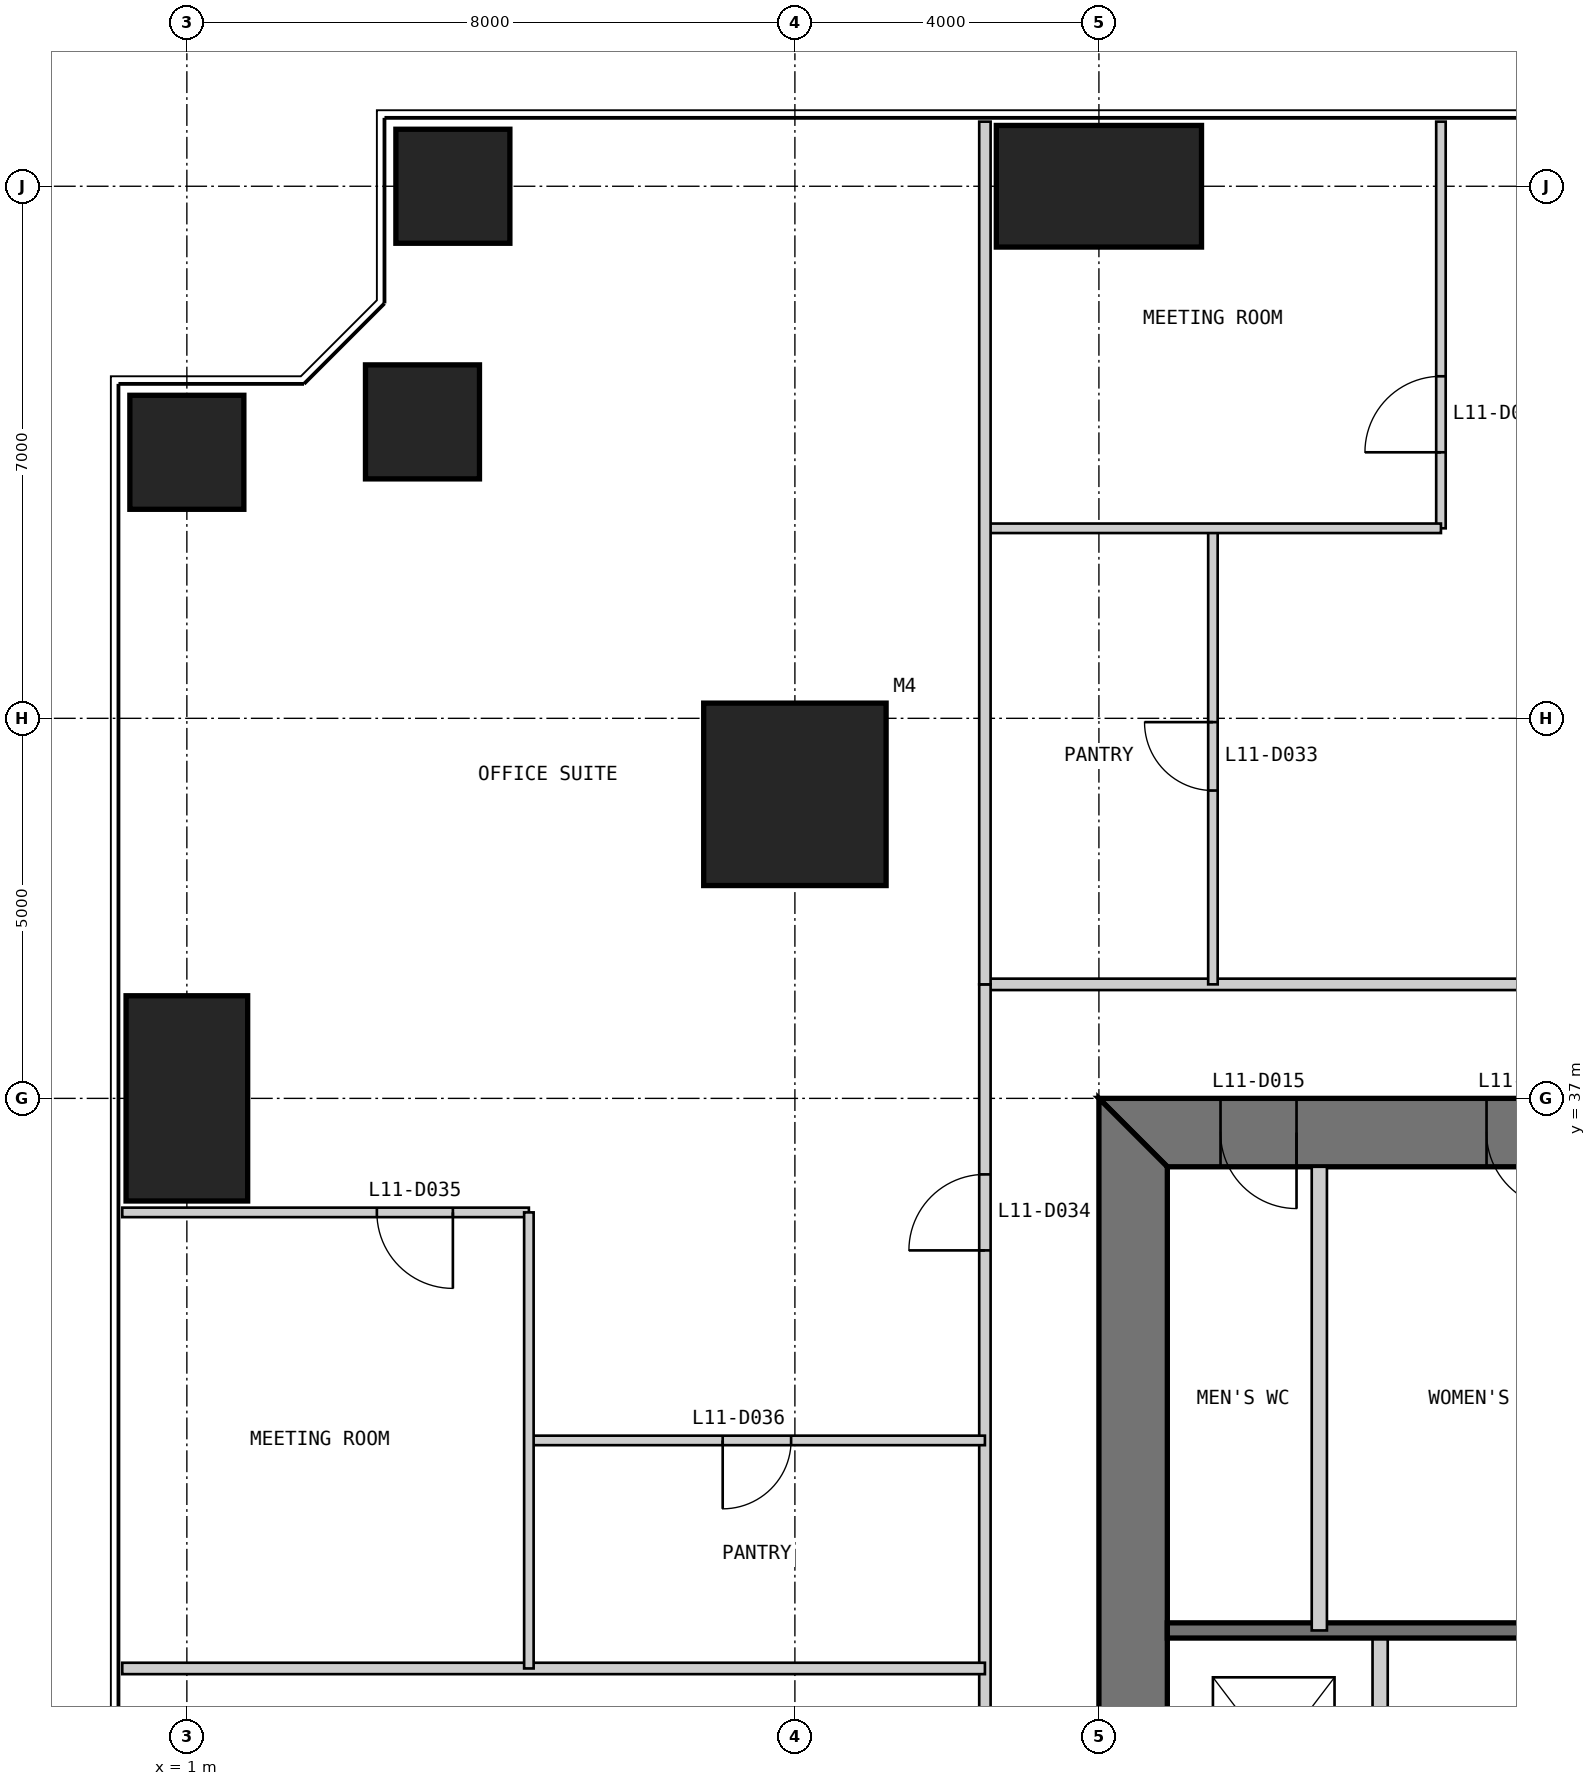
"""IFC4 building model, lengths in metres.
Left out: names, types, materials, properties, quantities, classifications, styles, units other than length and angle.
Written with IfcOpenShell. Run it as: python <this file> out.ifc"""

import sys

from ifc_helpers import new_model, si_unit, direction, frame, frame_2d, origin, origin_2d, place, context, subcontext, project, spatial, polyline, rectangle, outline, extrude, element, fill, save


model = new_model("IFC4")
c1 = context("Model", 3, precision=1e-05, world=origin(), true_north=direction((0.0, 1.0)))
c2 = subcontext(c1, "Body", "Model", "MODEL_VIEW")
j1 = project(units=[si_unit("LENGTHUNIT", "METRE"), si_unit("PLANEANGLEUNIT", "RADIAN")], contexts=[c1])
p1 = place(None, origin())
s1 = spatial("IfcSite", under=j1, at=p1, CompositionType="ELEMENT")
p2 = place(p1, origin())
s2 = spatial("IfcBuilding", under=s1, at=p2, CompositionType="ELEMENT")
p3 = place(p2, frame((0.0, 0.0, 51.0)))
s3 = spatial("IfcBuildingStorey", under=s2, at=p3, CompositionType="ELEMENT", Elevation=51.0)
p4 = place(p3, frame((9.0, 41.0, 0.0), z_axis=(0.0, 0.0, 1.0), x_axis=(1.0, 0.0, 0.0)))
e1 = element("IfcColumn", 1, at=p4, inside=s3, PredefinedType="COLUMN", context=c2, shape_type="SweptSolid", body=[
    extrude(rectangle(XDim=2.4, YDim=2.4, at=origin_2d()), origin(), (0.0, 0.0, 1.0), 4.0),
])
p5 = place(p3, frame((13.0, 49.0, 0.0), z_axis=(0.0, 0.0, 1.0), x_axis=(1.0, 0.0, 0.0)))
e2 = element("IfcColumn", 2, at=p5, inside=s3, PredefinedType="COLUMN", context=c2, shape_type="SweptSolid", body=[
    extrude(rectangle(XDim=2.7, YDim=1.6, at=origin_2d()), origin(), (0.0, 0.0, 1.0), 4.0),
])
for number, where, z_axis, x_axis in (
    (3, (4.5, 49.0, 0.0), (0.0, 0.0, 1.0), (1.0, 0.0, 0.0)),
    (4, (4.1, 45.9, 0.0), (0.0, 0.0, 1.0), (1.0, 0.0, 0.0)),
    (5, (1.0, 45.5, 0.0), (0.0, 0.0, 1.0), (1.0, 0.0, 0.0)),
):
    element("IfcColumn", number, at=place(p3, frame(where, z_axis=z_axis, x_axis=x_axis)), inside=s3, PredefinedType="COLUMN", context=c2, shape_type="SweptSolid", body=[
        extrude(rectangle(XDim=1.5, YDim=1.5, at=origin_2d()), origin(), (0.0, 0.0, 1.0), 4.0),
    ])
p6 = place(p3, frame((1.0, 37.0, 0.0), z_axis=(0.0, 0.0, 1.0), x_axis=(1.0, 0.0, 0.0)))
e6 = element("IfcColumn", 6, at=p6, inside=s3, PredefinedType="COLUMN", context=c2, shape_type="SweptSolid", body=[
    extrude(rectangle(XDim=1.6, YDim=2.7, at=origin_2d()), origin(), (0.0, 0.0, 1.0), 4.0),
])
p7 = place(p3, frame((37.0, 36.55, 0.0), z_axis=(0.0, 0.0, 1.0), x_axis=(-1.0, 0.0, 0.0)))
e7 = element("IfcWall", 7, at=p7, inside=s3, PredefinedType="SHEAR", context=c2, shape_type="SweptSolid", body=[
    extrude(outline(polyline([(0.0, -0.45), (24.0, -0.45), (23.1, 0.45), (0.9, 0.45), (0.0, -0.45)])), origin(), (0.0, 0.0, 1.0), 4.0),
])
p8 = place(p7, frame((4.9, 0.0, 0.0)))
e8 = element("IfcOpeningElement", 8, at=p8, cuts=e7, PredefinedType="OPENING", context=c2, shape_type="SweptSolid", body=[
    extrude(rectangle(XDim=1.0, YDim=2.2, at=frame_2d((0.5, 1.1))), frame((0.0, 0.46, 0.0), z_axis=(0.0, -1.0, 0.0), x_axis=(1.0, 0.0, 0.0)), (0.0, 0.0, 1.0), 0.92),
])
p9 = place(p7, frame((8.9, 0.0, 0.0)))
e9 = element("IfcOpeningElement", 9, at=p9, cuts=e7, PredefinedType="OPENING", context=c2, shape_type="SweptSolid", body=[
    extrude(rectangle(XDim=1.1, YDim=2.2, at=frame_2d((0.55, 1.1))), frame((0.0, 0.46, 0.0), z_axis=(0.0, -1.0, 0.0), x_axis=(1.0, 0.0, 0.0)), (0.0, 0.0, 1.0), 0.92),
])
p10 = place(p7, frame((15.05, 0.0, 0.0)))
e10 = element("IfcOpeningElement", 10, at=p10, cuts=e7, PredefinedType="OPENING", context=c2, shape_type="SweptSolid", body=[
    extrude(rectangle(XDim=0.9, YDim=2.2, at=frame_2d((0.45, 1.1))), frame((0.0, 0.46, 0.0), z_axis=(0.0, -1.0, 0.0), x_axis=(1.0, 0.0, 0.0)), (0.0, 0.0, 1.0), 0.92),
])
p11 = place(p7, frame((17.9, 0.0, 0.0)))
e11 = element("IfcOpeningElement", 11, at=p11, cuts=e7, PredefinedType="OPENING", context=c2, shape_type="SweptSolid", body=[
    extrude(rectangle(XDim=1.0, YDim=2.2, at=frame_2d((0.5, 1.1))), frame((0.0, 0.46, 0.0), z_axis=(0.0, -1.0, 0.0), x_axis=(1.0, 0.0, 0.0)), (0.0, 0.0, 1.0), 0.92),
])
p12 = place(p7, frame((21.4, 0.0, 0.0)))
e12 = element("IfcOpeningElement", 12, at=p12, cuts=e7, PredefinedType="OPENING", context=c2, shape_type="SweptSolid", body=[
    extrude(rectangle(XDim=1.0, YDim=2.2, at=frame_2d((0.5, 1.1))), frame((0.0, 0.46, 0.0), z_axis=(0.0, -1.0, 0.0), x_axis=(1.0, 0.0, 0.0)), (0.0, 0.0, 1.0), 0.92),
])
p13 = place(p3, frame((13.45, 36.1, 0.0), z_axis=(0.0, 0.0, 1.0), x_axis=(0.0, -1.0, 0.0)))
e13 = element("IfcWall", 13, at=p13, inside=s3, PredefinedType="SHEAR", context=c2, shape_type="SweptSolid", body=[
    extrude(outline(polyline([(-0.9, -0.45), (23.1, -0.45), (22.2, 0.45), (0.0, 0.45), (-0.9, -0.45)])), origin(), (0.0, 0.0, 1.0), 4.0),
])
p14 = place(p13, frame((20.2, 0.0, 0.0)))
e14 = element("IfcOpeningElement", 14, at=p14, cuts=e13, PredefinedType="OPENING", context=c2, shape_type="SweptSolid", body=[
    extrude(rectangle(XDim=1.0, YDim=2.2, at=frame_2d((0.5, 1.1))), frame((0.0, 0.46, 0.0), z_axis=(0.0, -1.0, 0.0), x_axis=(1.0, 0.0, 0.0)), (0.0, 0.0, 1.0), 0.92),
])
p15 = place(p13, frame((17.25, 0.0, 0.0)))
e15 = element("IfcOpeningElement", 15, at=p15, cuts=e13, PredefinedType="OPENING", context=c2, shape_type="SweptSolid", body=[
    extrude(rectangle(XDim=0.9, YDim=2.2, at=frame_2d((0.45, 1.1))), frame((0.0, 0.46, 0.0), z_axis=(0.0, -1.0, 0.0), x_axis=(1.0, 0.0, 0.0)), (0.0, 0.0, 1.0), 0.92),
])
p16 = place(p3, frame((16.7, 13.9, 0.0), z_axis=(0.0, 0.0, 1.0), x_axis=(0.0, 1.0, 0.0)))
e16 = element("IfcWall", 16, at=p16, inside=s3, PredefinedType="PARTITIONING", context=c2, shape_type="SweptSolid", body=[
    extrude(rectangle(XDim=16.1, YDim=0.2, at=frame_2d((8.05, 0.0))), origin(), (0.0, 0.0, 1.0), 3.8),
])
p17 = place(p16, frame((4.1, 0.0, 0.0)))
e17 = element("IfcOpeningElement", 17, at=p17, cuts=e16, PredefinedType="OPENING", context=c2, shape_type="SweptSolid", body=[
    extrude(rectangle(XDim=0.9, YDim=2.2, at=frame_2d((0.45, 1.1))), frame((0.0, 0.11, 0.0), z_axis=(0.0, -1.0, 0.0), x_axis=(1.0, 0.0, 0.0)), (0.0, 0.0, 1.0), 0.22),
])
p18 = place(p16, frame((7.217, 0.0, 0.0)))
e18 = element("IfcOpeningElement", 18, at=p18, cuts=e16, PredefinedType="OPENING", context=c2, shape_type="SweptSolid", body=[
    extrude(rectangle(XDim=1.1, YDim=2.2, at=frame_2d((0.55, 1.1))), frame((0.0, 0.11, 0.0), z_axis=(0.0, -1.0, 0.0), x_axis=(1.0, 0.0, 0.0)), (0.0, 0.0, 1.0), 0.22),
])
p19 = place(p16, frame((10.55, 0.0, 0.0)))
e19 = element("IfcOpeningElement", 19, at=p19, cuts=e16, PredefinedType="OPENING", context=c2, shape_type="SweptSolid", body=[
    extrude(rectangle(XDim=1.1, YDim=2.2, at=frame_2d((0.55, 1.1))), frame((0.0, 0.11, 0.0), z_axis=(0.0, -1.0, 0.0), x_axis=(1.0, 0.0, 0.0)), (0.0, 0.0, 1.0), 0.22),
])
p20 = place(p16, frame((13.883, 0.0, 0.0)))
e20 = element("IfcOpeningElement", 20, at=p20, cuts=e16, PredefinedType="OPENING", context=c2, shape_type="SweptSolid", body=[
    extrude(rectangle(XDim=1.1, YDim=2.2, at=frame_2d((0.55, 1.1))), frame((0.0, 0.11, 0.0), z_axis=(0.0, -1.0, 0.0), x_axis=(1.0, 0.0, 0.0)), (0.0, 0.0, 1.0), 0.22),
])
p21 = place(p3, frame((29.7, 30.0, 0.0), z_axis=(0.0, 0.0, 1.0), x_axis=(-1.0, 0.0, 0.0)))
e21 = element("IfcWall", 21, at=p21, inside=s3, PredefinedType="SOLIDWALL", context=c2, shape_type="SweptSolid", body=[
    extrude(rectangle(XDim=15.8, YDim=0.2, at=frame_2d((7.9, 0.0))), origin(), (0.0, 0.0, 1.0), 3.8),
])
p22 = place(p3, frame((15.9, 36.1, 0.0), z_axis=(0.0, 0.0, 1.0), x_axis=(0.0, -1.0, 0.0)))
e22 = element("IfcWall", 22, at=p22, inside=s3, PredefinedType="PARTITIONING", context=c2, shape_type="SweptSolid", body=[
    extrude(rectangle(XDim=6.1, YDim=0.2, at=frame_2d((3.05, 0.0))), origin(), (0.0, 0.0, 1.0), 3.8),
])
p23 = place(p3, frame((38.5, 38.5, 0.0), z_axis=(0.0, 0.0, 1.0), x_axis=(-1.0, 0.0, 0.0)))
e23 = element("IfcWall", 23, at=p23, inside=s3, PredefinedType="PARTITIONING", context=c2, shape_type="SweptSolid", body=[
    extrude(rectangle(XDim=27.0, YDim=0.15, at=frame_2d((13.5, 0.0))), origin(), (0.0, 0.0, 1.0), 3.85),
])
p24 = place(p23, frame((2.5, 0.0, 0.0)))
e24 = element("IfcOpeningElement", 24, at=p24, cuts=e23, PredefinedType="OPENING", context=c2, shape_type="SweptSolid", body=[
    extrude(rectangle(XDim=1.0, YDim=2.2, at=frame_2d((0.5, 1.1))), frame((0.0, 0.085, 0.0), z_axis=(0.0, -1.0, 0.0), x_axis=(1.0, 0.0, 0.0)), (0.0, 0.0, 1.0), 0.17),
])
p25 = place(p23, frame((16.0, 0.0, 0.0)))
e25 = element("IfcOpeningElement", 25, at=p25, cuts=e23, PredefinedType="OPENING", context=c2, shape_type="SweptSolid", body=[
    extrude(rectangle(XDim=1.0, YDim=2.2, at=frame_2d((0.5, 1.1))), frame((0.0, 0.085, 0.0), z_axis=(0.0, -1.0, 0.0), x_axis=(1.0, 0.0, 0.0)), (0.0, 0.0, 1.0), 0.17),
])
p26 = place(p3, frame((17.5, 49.85, 0.0), z_axis=(0.0, 0.0, 1.0), x_axis=(0.0, -1.0, 0.0)))
e26 = element("IfcWall", 26, at=p26, inside=s3, PredefinedType="PARTITIONING", context=c2, shape_type="SweptSolid", body=[
    extrude(rectangle(XDim=5.35, YDim=0.125, at=frame_2d((2.675, 0.0))), origin(), (0.0, 0.0, 1.0), 3.85),
])
p27 = place(p26, frame((3.35, 0.0, 0.0)))
e27 = element("IfcOpeningElement", 27, at=p27, cuts=e26, PredefinedType="OPENING", context=c2, shape_type="SweptSolid", body=[
    extrude(rectangle(XDim=1.0, YDim=2.2, at=frame_2d((0.5, 1.1))), frame((0.0, 0.073, 0.0), z_axis=(0.0, -1.0, 0.0), x_axis=(1.0, 0.0, 0.0)), (0.0, 0.0, 1.0), 0.145),
])
p28 = place(p3, frame((14.5, 44.5, 0.0), z_axis=(0.0, 0.0, 1.0), x_axis=(0.0, -1.0, 0.0)))
e28 = element("IfcWall", 28, at=p28, inside=s3, PredefinedType="PARTITIONING", context=c2, shape_type="SweptSolid", body=[
    extrude(rectangle(XDim=6.0, YDim=0.125, at=frame_2d((3.0, 0.0))), origin(), (0.0, 0.0, 1.0), 3.85),
])
p29 = place(p28, frame((2.55, 0.0, 0.0)))
e29 = element("IfcOpeningElement", 29, at=p29, cuts=e28, PredefinedType="OPENING", context=c2, shape_type="SweptSolid", body=[
    extrude(rectangle(XDim=0.9, YDim=2.2, at=frame_2d((0.45, 1.1))), frame((0.0, 0.073, 0.0), z_axis=(0.0, -1.0, 0.0), x_axis=(1.0, 0.0, 0.0)), (0.0, 0.0, 1.0), 0.145),
])
p30 = place(p3, frame((17.5, 44.5, 0.0), z_axis=(0.0, 0.0, 1.0), x_axis=(-1.0, 0.0, 0.0)))
e30 = element("IfcWall", 30, at=p30, inside=s3, PredefinedType="PARTITIONING", context=c2, shape_type="SweptSolid", body=[
    extrude(rectangle(XDim=6.0, YDim=0.125, at=frame_2d((3.0, 0.0))), origin(), (0.0, 0.0, 1.0), 3.85),
])
p31 = place(p3, frame((11.5, 38.5, 0.0), z_axis=(0.0, 0.0, 1.0), x_axis=(0.0, -1.0, 0.0)))
e31 = element("IfcWall", 31, at=p31, inside=s3, PredefinedType="PARTITIONING", context=c2, shape_type="SweptSolid", body=[
    extrude(rectangle(XDim=27.0, YDim=0.15, at=frame_2d((13.5, 0.0))), origin(), (0.0, 0.0, 1.0), 3.85),
])
p32 = place(p31, frame((2.5, 0.0, 0.0)))
e32 = element("IfcOpeningElement", 32, at=p32, cuts=e31, PredefinedType="OPENING", context=c2, shape_type="SweptSolid", body=[
    extrude(rectangle(XDim=1.0, YDim=2.2, at=frame_2d((0.5, 1.1))), frame((0.0, 0.085, 0.0), z_axis=(0.0, -1.0, 0.0), x_axis=(1.0, 0.0, 0.0)), (0.0, 0.0, 1.0), 0.17),
])
p33 = place(p31, frame((13.0, 0.0, 0.0)))
e33 = element("IfcOpeningElement", 33, at=p33, cuts=e31, PredefinedType="OPENING", context=c2, shape_type="SweptSolid", body=[
    extrude(rectangle(XDim=1.0, YDim=2.2, at=frame_2d((0.5, 1.1))), frame((0.0, 0.085, 0.0), z_axis=(0.0, -1.0, 0.0), x_axis=(1.0, 0.0, 0.0)), (0.0, 0.0, 1.0), 0.17),
])
p34 = place(p31, frame((23.5, 0.0, 0.0)))
e34 = element("IfcOpeningElement", 34, at=p34, cuts=e31, PredefinedType="OPENING", context=c2, shape_type="SweptSolid", body=[
    extrude(rectangle(XDim=1.0, YDim=2.2, at=frame_2d((0.5, 1.1))), frame((0.0, 0.085, 0.0), z_axis=(0.0, -1.0, 0.0), x_axis=(1.0, 0.0, 0.0)), (0.0, 0.0, 1.0), 0.17),
])
p35 = place(p3, frame((11.5, 49.85, 0.0), z_axis=(0.0, 0.0, 1.0), x_axis=(0.0, -1.0, 0.0)))
e35 = element("IfcWall", 35, at=p35, inside=s3, PredefinedType="PARTITIONING", context=c2, shape_type="SweptSolid", body=[
    extrude(rectangle(XDim=11.35, YDim=0.15, at=frame_2d((5.675, 0.0))), origin(), (0.0, 0.0, 1.0), 3.85),
])
p36 = place(p3, frame((0.15, 35.5, 0.0), z_axis=(0.0, 0.0, 1.0), x_axis=(1.0, 0.0, 0.0)))
e36 = element("IfcWall", 36, at=p36, inside=s3, PredefinedType="PARTITIONING", context=c2, shape_type="SweptSolid", body=[
    extrude(rectangle(XDim=5.35, YDim=0.125, at=frame_2d((2.675, 0.0))), origin(), (0.0, 0.0, 1.0), 3.85),
])
p37 = place(p36, frame((3.35, 0.0, 0.0)))
e37 = element("IfcOpeningElement", 37, at=p37, cuts=e36, PredefinedType="OPENING", context=c2, shape_type="SweptSolid", body=[
    extrude(rectangle(XDim=1.0, YDim=2.2, at=frame_2d((0.5, 1.1))), frame((0.0, 0.073, 0.0), z_axis=(0.0, -1.0, 0.0), x_axis=(1.0, 0.0, 0.0)), (0.0, 0.0, 1.0), 0.145),
])
p38 = place(p3, frame((5.5, 32.5, 0.0), z_axis=(0.0, 0.0, 1.0), x_axis=(1.0, 0.0, 0.0)))
e38 = element("IfcWall", 38, at=p38, inside=s3, PredefinedType="PARTITIONING", context=c2, shape_type="SweptSolid", body=[
    extrude(rectangle(XDim=6.0, YDim=0.125, at=frame_2d((3.0, 0.0))), origin(), (0.0, 0.0, 1.0), 3.85),
])
p39 = place(p38, frame((2.55, 0.0, 0.0)))
e39 = element("IfcOpeningElement", 39, at=p39, cuts=e38, PredefinedType="OPENING", context=c2, shape_type="SweptSolid", body=[
    extrude(rectangle(XDim=0.9, YDim=2.2, at=frame_2d((0.45, 1.1))), frame((0.0, 0.073, 0.0), z_axis=(0.0, -1.0, 0.0), x_axis=(1.0, 0.0, 0.0)), (0.0, 0.0, 1.0), 0.145),
])
p40 = place(p3, frame((0.15, 29.5, 0.0), z_axis=(0.0, 0.0, 1.0), x_axis=(1.0, 0.0, 0.0)))
e40 = element("IfcWall", 40, at=p40, inside=s3, PredefinedType="PARTITIONING", context=c2, shape_type="SweptSolid", body=[
    extrude(rectangle(XDim=11.35, YDim=0.15, at=frame_2d((5.675, 0.0))), origin(), (0.0, 0.0, 1.0), 3.85),
])
p41 = place(p3, frame((5.5, 35.5, 0.0), z_axis=(0.0, 0.0, 1.0), x_axis=(0.0, -1.0, 0.0)))
e41 = element("IfcWall", 41, at=p41, inside=s3, PredefinedType="PARTITIONING", context=c2, shape_type="SweptSolid", body=[
    extrude(rectangle(XDim=6.0, YDim=0.125, at=frame_2d((3.0, 0.0))), origin(), (0.0, 0.0, 1.0), 3.85),
])
p42 = place(p11, origin())
e42 = element("IfcDoor", 42, at=p42, inside=s3, OperationType="SINGLE_SWING_LEFT", PredefinedType="DOOR", context=c2, shape_type="SweptSolid", body=[
    extrude(rectangle(XDim=1.0, YDim=2.2, at=frame_2d((0.5, 1.1))), frame((0.0, 0.025, 0.0), z_axis=(0.0, -1.0, 0.0), x_axis=(1.0, 0.0, 0.0)), (0.0, 0.0, 1.0), 0.05),
    extrude(outline(polyline([(0.0, 0.0), (0.04, 0.0), (0.04, 2.16), (0.96, 2.16), (0.96, 0.0), (1.0, 0.0), (1.0, 2.2), (0.0, 2.2), (0.0, 0.0)])), frame((0.0, 0.3, 0.0), z_axis=(0.0, -1.0, 0.0), x_axis=(1.0, 0.0, 0.0)), (0.0, 0.0, 1.0), 0.6),
])
fill(e11, e42)
p43 = place(p12, origin())
e43 = element("IfcDoor", 43, at=p43, inside=s3, OperationType="SINGLE_SWING_LEFT", PredefinedType="DOOR", context=c2, shape_type="SweptSolid", body=[
    extrude(rectangle(XDim=1.0, YDim=2.2, at=frame_2d((0.5, 1.1))), frame((0.0, 0.025, 0.0), z_axis=(0.0, -1.0, 0.0), x_axis=(1.0, 0.0, 0.0)), (0.0, 0.0, 1.0), 0.05),
    extrude(outline(polyline([(0.0, 0.0), (0.04, 0.0), (0.04, 2.16), (0.96, 2.16), (0.96, 0.0), (1.0, 0.0), (1.0, 2.2), (0.0, 2.2), (0.0, 0.0)])), frame((0.0, 0.3, 0.0), z_axis=(0.0, -1.0, 0.0), x_axis=(1.0, 0.0, 0.0)), (0.0, 0.0, 1.0), 0.6),
])
fill(e12, e43)
p44 = place(p27, frame((1.0, 0.0, 0.0), z_axis=(0.0, 0.0, 1.0), x_axis=(-1.0, 0.0, 0.0)))
e44 = element("IfcDoor", 44, at=p44, inside=s3, OperationType="SINGLE_SWING_LEFT", PredefinedType="DOOR", context=c2, shape_type="SweptSolid", body=[
    extrude(rectangle(XDim=1.0, YDim=2.2, at=frame_2d((0.5, 1.1))), frame((0.0, 0.025, 0.0), z_axis=(0.0, -1.0, 0.0), x_axis=(1.0, 0.0, 0.0)), (0.0, 0.0, 1.0), 0.05),
])
fill(e27, e44)
p45 = place(p29, frame((0.9, 0.0, 0.0), z_axis=(0.0, 0.0, 1.0), x_axis=(-1.0, 0.0, 0.0)))
e45 = element("IfcDoor", 45, at=p45, inside=s3, OperationType="SINGLE_SWING_RIGHT", PredefinedType="DOOR", context=c2, shape_type="SweptSolid", body=[
    extrude(rectangle(XDim=0.9, YDim=2.2, at=frame_2d((0.45, 1.1))), frame((0.0, 0.025, 0.0), z_axis=(0.0, -1.0, 0.0), x_axis=(1.0, 0.0, 0.0)), (0.0, 0.0, 1.0), 0.05),
])
fill(e29, e45)
p46 = place(p32, frame((1.0, 0.0, 0.0), z_axis=(0.0, 0.0, 1.0), x_axis=(-1.0, 0.0, 0.0)))
e46 = element("IfcDoor", 46, at=p46, inside=s3, OperationType="SINGLE_SWING_LEFT", PredefinedType="DOOR", context=c2, shape_type="SweptSolid", body=[
    extrude(rectangle(XDim=1.0, YDim=2.2, at=frame_2d((0.5, 1.1))), frame((0.0, 0.025, 0.0), z_axis=(0.0, -1.0, 0.0), x_axis=(1.0, 0.0, 0.0)), (0.0, 0.0, 1.0), 0.05),
])
fill(e32, e46)
p47 = place(p37, frame((1.0, 0.0, 0.0), z_axis=(0.0, 0.0, 1.0), x_axis=(-1.0, 0.0, 0.0)))
e47 = element("IfcDoor", 47, at=p47, inside=s3, OperationType="SINGLE_SWING_LEFT", PredefinedType="DOOR", context=c2, shape_type="SweptSolid", body=[
    extrude(rectangle(XDim=1.0, YDim=2.2, at=frame_2d((0.5, 1.1))), frame((0.0, 0.025, 0.0), z_axis=(0.0, -1.0, 0.0), x_axis=(1.0, 0.0, 0.0)), (0.0, 0.0, 1.0), 0.05),
])
fill(e37, e47)
p48 = place(p39, frame((0.9, 0.0, 0.0), z_axis=(0.0, 0.0, 1.0), x_axis=(-1.0, 0.0, 0.0)))
e48 = element("IfcDoor", 48, at=p48, inside=s3, OperationType="SINGLE_SWING_RIGHT", PredefinedType="DOOR", context=c2, shape_type="SweptSolid", body=[
    extrude(rectangle(XDim=0.9, YDim=2.2, at=frame_2d((0.45, 1.1))), frame((0.0, 0.025, 0.0), z_axis=(0.0, -1.0, 0.0), x_axis=(1.0, 0.0, 0.0)), (0.0, 0.0, 1.0), 0.05),
])
fill(e39, e48)
save(model, sys.argv[1])
